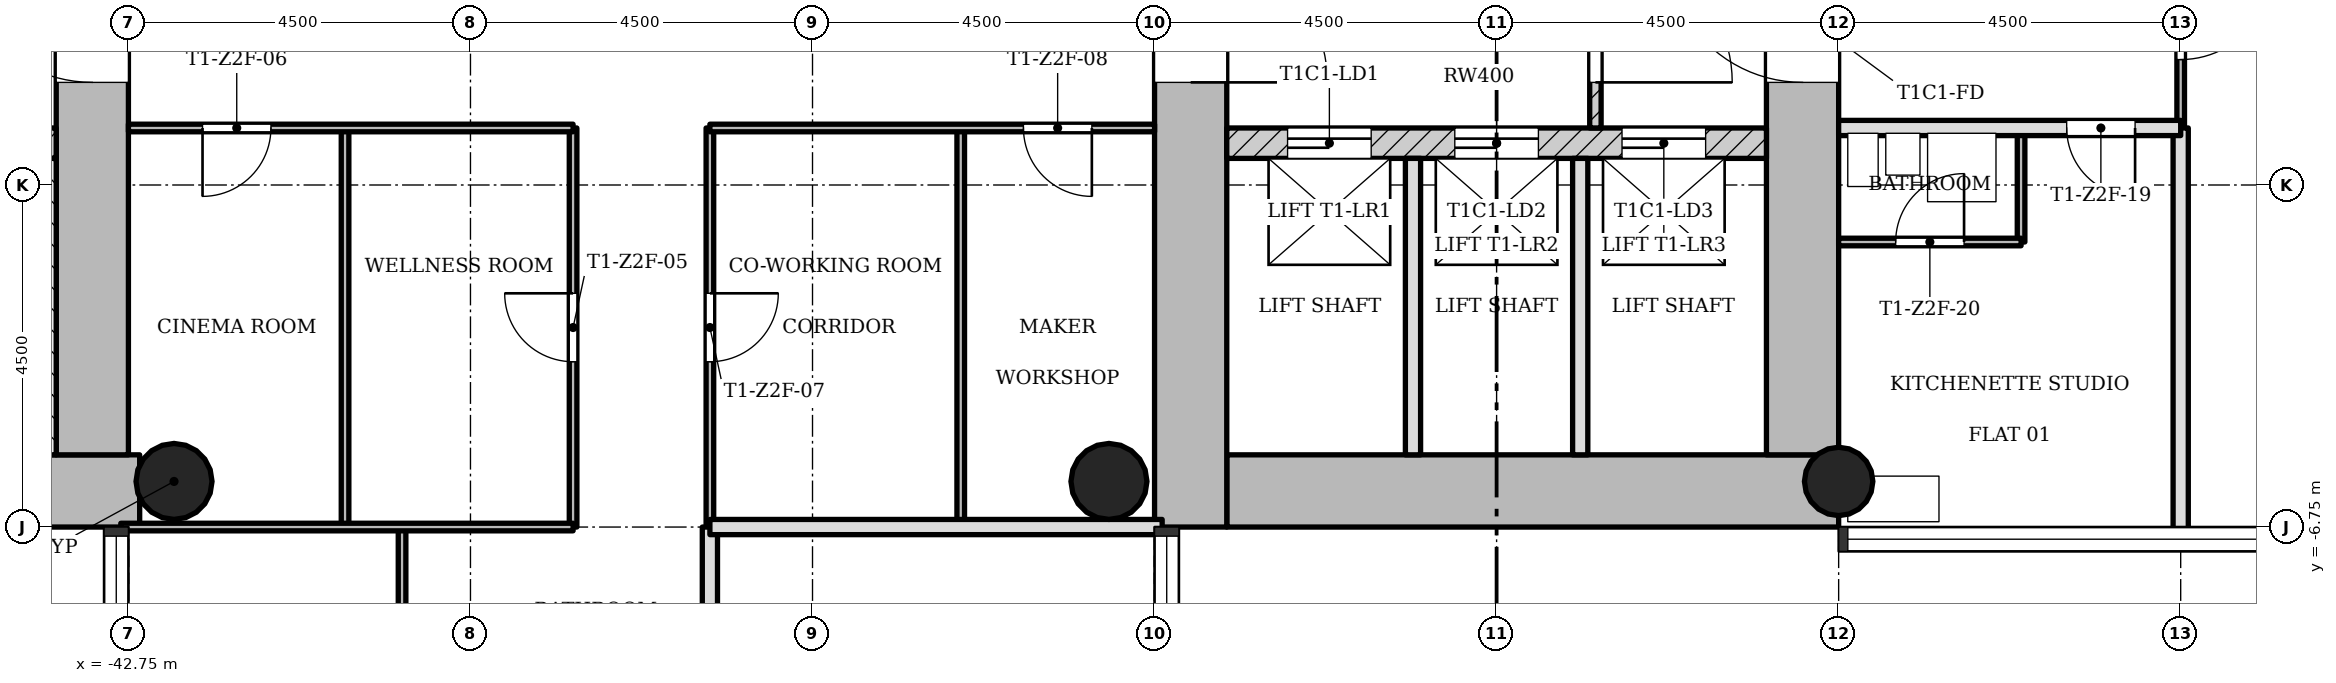
"""IFC4 building model, lengths in metres.
Left out: names, types, materials, properties, quantities, classifications, styles, units other than length and angle.
Written with IfcOpenShell. Run it as: python <this file> out.ifc"""

import sys

from ifc_helpers import new_model, si_unit, direction, frame, frame_2d, origin, origin_2d, place, context, subcontext, project, spatial, rectangle, hollow_circle, extrude, element, fill, save


model = new_model("IFC4")
c1 = context("Model", 3, precision=1e-05, world=origin(), true_north=direction((0.0, 1.0)))
c2 = subcontext(c1, "Body", "Model", "MODEL_VIEW")
j1 = project(units=[si_unit("LENGTHUNIT", "METRE"), si_unit("PLANEANGLEUNIT", "RADIAN")], contexts=[c1])
p1 = place(None, origin())
s1 = spatial("IfcSite", under=j1, at=p1, CompositionType="ELEMENT")
p2 = place(p1, origin())
s2 = spatial("IfcBuilding", under=s1, at=p2, CompositionType="ELEMENT")
p3 = place(p2, frame((0.0, 0.0, 110.6)))
s3 = spatial("IfcBuildingStorey", under=s2, at=p3, CompositionType="ELEMENT", Elevation=110.6)
p4 = place(p3, frame((-28.3, -6.275, 0.0), z_axis=(0.0, 0.0, 1.0), x_axis=(1.0, 0.0, 0.0)))
e1 = element("IfcWall", 1, at=p4, inside=s3, PredefinedType="SHEAR", context=c2, shape_type="SweptSolid", body=[
    extrude(rectangle(XDim=8.05, YDim=0.95, at=frame_2d((4.025, 0.0))), origin(), (0.0, 0.0, 1.0), 3.4),
])
p5 = place(p3, frame((-20.725, -5.8, 0.0), z_axis=(0.0, 0.0, 1.0), x_axis=(0.0, 1.0, 0.0)))
e2 = element("IfcWall", 2, at=p5, inside=s3, PredefinedType="SHEAR", context=c2, shape_type="SweptSolid", body=[
    extrude(rectangle(XDim=12.55, YDim=0.95, at=frame_2d((6.275, 0.0))), origin(), (0.0, 0.0, 1.0), 3.4),
])
p6 = place(p5, frame((4.9, 0.0, 0.0)))
e3 = element("IfcOpeningElement", 3, at=p6, cuts=e2, PredefinedType="OPENING", context=c2, shape_type="SweptSolid", body=[
    extrude(rectangle(XDim=1.8, YDim=2.1, at=frame_2d((0.9, 1.05))), frame((0.0, 0.485, 0.0), z_axis=(0.0, -1.0, 0.0), x_axis=(1.0, 0.0, 0.0)), (0.0, 0.0, 1.0), 0.97),
])
p7 = place(p3, frame((-28.775, 5.8, 0.0), z_axis=(0.0, 0.0, 1.0), x_axis=(0.0, -1.0, 0.0)))
e4 = element("IfcWall", 4, at=p7, inside=s3, PredefinedType="SHEAR", context=c2, shape_type="SweptSolid", body=[
    extrude(rectangle(XDim=12.55, YDim=0.95, at=frame_2d((6.275, 0.0))), origin(), (0.0, 0.0, 1.0), 3.4),
])
p8 = place(p7, frame((4.9, 0.0, 0.0)))
e5 = element("IfcOpeningElement", 5, at=p8, cuts=e4, PredefinedType="OPENING", context=c2, shape_type="SweptSolid", body=[
    extrude(rectangle(XDim=1.8, YDim=2.1, at=frame_2d((0.9, 1.05))), frame((0.0, 0.485, 0.0), z_axis=(0.0, -1.0, 0.0), x_axis=(1.0, 0.0, 0.0)), (0.0, 0.0, 1.0), 0.97),
])
p9 = place(p3, frame((-28.3, -1.7, 0.0), z_axis=(0.0, 0.0, 1.0), x_axis=(1.0, 0.0, 0.0)))
e6 = element("IfcWall", 6, at=p9, inside=s3, PredefinedType="SHEAR", context=c2, shape_type="SweptSolid", body=[
    extrude(rectangle(XDim=7.1, YDim=0.4, at=frame_2d((3.55, 0.0))), origin(), (0.0, 0.0, 1.0), 3.4),
])
p10 = place(p9, frame((0.8, 0.0, 0.0)))
e7 = element("IfcOpeningElement", 7, at=p10, cuts=e6, PredefinedType="OPENING", context=c2, shape_type="SweptSolid", body=[
    extrude(rectangle(XDim=1.1, YDim=2.1, at=frame_2d((0.55, 1.05))), frame((0.0, 0.21, 0.0), z_axis=(0.0, -1.0, 0.0), x_axis=(1.0, 0.0, 0.0)), (0.0, 0.0, 1.0), 0.42),
])
p11 = place(p9, frame((3.0, 0.0, 0.0)))
e8 = element("IfcOpeningElement", 8, at=p11, cuts=e6, PredefinedType="OPENING", context=c2, shape_type="SweptSolid", body=[
    extrude(rectangle(XDim=1.1, YDim=2.1, at=frame_2d((0.55, 1.05))), frame((0.0, 0.21, 0.0), z_axis=(0.0, -1.0, 0.0), x_axis=(1.0, 0.0, 0.0)), (0.0, 0.0, 1.0), 0.42),
])
p12 = place(p9, frame((5.2, 0.0, 0.0)))
e9 = element("IfcOpeningElement", 9, at=p12, cuts=e6, PredefinedType="OPENING", context=c2, shape_type="SweptSolid", body=[
    extrude(rectangle(XDim=1.1, YDim=2.1, at=frame_2d((0.55, 1.05))), frame((0.0, 0.21, 0.0), z_axis=(0.0, -1.0, 0.0), x_axis=(1.0, 0.0, 0.0)), (0.0, 0.0, 1.0), 0.42),
])
p13 = place(p3, frame((-51.298, -6.275, 0.0), z_axis=(0.0, 0.0, 1.0), x_axis=(1.0, 0.0, 0.0)))
e10 = element("IfcWall", 10, at=p13, inside=s3, PredefinedType="SHEAR", context=c2, shape_type="SweptSolid", body=[
    extrude(rectangle(XDim=8.696, YDim=0.95, at=frame_2d((4.348, 0.0))), origin(), (0.0, 0.0, 1.0), 3.4),
])
p14 = place(p3, frame((-43.225, -5.8, 0.0), z_axis=(0.0, 0.0, 1.0), x_axis=(0.0, 1.0, 0.0)))
e11 = element("IfcWall", 11, at=p14, inside=s3, PredefinedType="SHEAR", context=c2, shape_type="SweptSolid", body=[
    extrude(rectangle(XDim=12.55, YDim=0.95, at=frame_2d((6.275, 0.0))), origin(), (0.0, 0.0, 1.0), 3.4),
])
p15 = place(p14, frame((4.9, 0.0, 0.0)))
e12 = element("IfcOpeningElement", 12, at=p15, cuts=e11, PredefinedType="OPENING", context=c2, shape_type="SweptSolid", body=[
    extrude(rectangle(XDim=1.8, YDim=2.1, at=frame_2d((0.9, 1.05))), frame((0.0, 0.485, 0.0), z_axis=(0.0, -1.0, 0.0), x_axis=(1.0, 0.0, 0.0)), (0.0, 0.0, 1.0), 0.97),
])
p16 = place(p3, frame((-50.8, -1.7, 0.0), z_axis=(0.0, 0.0, 1.0), x_axis=(1.0, 0.0, 0.0)))
e13 = element("IfcWall", 13, at=p16, inside=s3, PredefinedType="SHEAR", context=c2, shape_type="SweptSolid", body=[
    extrude(rectangle(XDim=7.1, YDim=0.4, at=frame_2d((3.55, 0.0))), origin(), (0.0, 0.0, 1.0), 3.4),
])
p17 = place(p16, frame((5.5, 0.0, 0.0)))
e14 = element("IfcOpeningElement", 14, at=p17, cuts=e13, PredefinedType="OPENING", context=c2, shape_type="SweptSolid", body=[
    extrude(rectangle(XDim=0.9, YDim=2.1, at=frame_2d((0.45, 1.05))), frame((0.0, 0.21, 0.0), z_axis=(0.0, -1.0, 0.0), x_axis=(1.0, 0.0, 0.0)), (0.0, 0.0, 1.0), 0.42),
])
p18 = place(p3, frame((-20.25, -6.15, 0.0), z_axis=(0.0, 0.0, 1.0), x_axis=(1.0, 0.0, 0.0)))
e15 = element("IfcColumn", 15, at=p18, inside=s3, PredefinedType="COLUMN", context=c2, shape_type="SweptSolid", body=[
    extrude(hollow_circle(Radius=0.45, WallThickness=0.032, at=origin_2d()), origin(), (0.0, 0.0, 1.0), 3.4),
])
for number, where, z_axis, x_axis in (
    (16, (-42.15, -6.15, 0.0), (0.0, 0.0, 1.0), (1.0, 0.0, 0.0)),
    (17, (-29.85, -6.15, 0.0), (0.0, 0.0, 1.0), (1.0, 0.0, 0.0)),
):
    element("IfcColumn", number, at=place(p3, frame(where, z_axis=z_axis, x_axis=x_axis)), inside=s3, PredefinedType="COLUMN", context=c2, shape_type="SweptSolid", body=[
        extrude(hollow_circle(Radius=0.5, WallThickness=0.036, at=origin_2d()), origin(), (0.0, 0.0, 1.0), 3.4),
    ])
p19 = place(p3, frame((-23.45, -1.5, 0.0), z_axis=(0.0, 0.0, 1.0), x_axis=(0.0, 1.0, 0.0)))
e18 = element("IfcWall", 18, at=p19, inside=s3, PredefinedType="PARTITIONING", context=c2, shape_type="SweptSolid", body=[
    extrude(rectangle(XDim=3.0, YDim=0.15, at=frame_2d((1.5, 0.0))), origin(), (0.0, 0.0, 1.0), 3.0),
])
p20 = place(p19, frame((0.6, 0.0, 0.0)))
e19 = element("IfcOpeningElement", 19, at=p20, cuts=e18, PredefinedType="OPENING", context=c2, shape_type="SweptSolid", body=[
    extrude(rectangle(XDim=1.8, YDim=2.1, at=frame_2d((0.9, 1.05))), frame((0.0, 0.085, 0.0), z_axis=(0.0, -1.0, 0.0), x_axis=(1.0, 0.0, 0.0)), (0.0, 0.0, 1.0), 0.17),
])
for number, where, z_axis, x_axis in (
    (20, (-25.85, -5.8, 0.0), (0.0, 0.0, 1.0), (0.0, 1.0, 0.0)),
    (21, (-23.65, -5.8, 0.0), (0.0, 0.0, 1.0), (0.0, 1.0, 0.0)),
):
    element("IfcWall", number, at=place(p3, frame(where, z_axis=z_axis, x_axis=x_axis)), inside=s3, PredefinedType="SOLIDWALL", context=c2, shape_type="SweptSolid", body=[
        extrude(rectangle(XDim=3.9, YDim=0.2, at=frame_2d((1.95, 0.0))), origin(), (0.0, 0.0, 1.0), 3.0),
    ])
p21 = place(p3, frame((-39.9, -6.75, 0.0), z_axis=(0.0, 0.0, 1.0), x_axis=(0.0, 1.0, 0.0)))
e22 = element("IfcWall", 22, at=p21, inside=s3, PredefinedType="PARTITIONING", context=c2, shape_type="SweptSolid", body=[
    extrude(rectangle(XDim=5.25, YDim=0.1, at=frame_2d((2.625, 0.0))), origin(), (0.0, 0.0, 1.0), 3.0),
])
p22 = place(p3, frame((-39.15, -15.75, 0.0), z_axis=(0.0, 0.0, 1.0), x_axis=(0.0, 1.0, 0.0)))
e23 = element("IfcWall", 23, at=p22, inside=s3, PredefinedType="PARTITIONING", context=c2, shape_type="SweptSolid", body=[
    extrude(rectangle(XDim=9.0, YDim=0.1, at=frame_2d((4.5, 0.0))), origin(), (0.0, 0.0, 1.0), 3.0),
])
p23 = place(p22, frame((5.55, 0.0, 0.0)))
e24 = element("IfcOpeningElement", 24, at=p23, cuts=e23, PredefinedType="OPENING", context=c2, shape_type="SweptSolid", body=[
    extrude(rectangle(XDim=0.9, YDim=2.1, at=frame_2d((0.45, 1.05))), frame((0.0, 0.06, 0.0), z_axis=(0.0, -1.0, 0.0), x_axis=(1.0, 0.0, 0.0)), (0.0, 0.0, 1.0), 0.12),
])
p24 = place(p3, frame((-36.9, -6.75, 0.0), z_axis=(0.0, 0.0, 1.0), x_axis=(0.0, 1.0, 0.0)))
e25 = element("IfcWall", 25, at=p24, inside=s3, PredefinedType="PARTITIONING", context=c2, shape_type="SweptSolid", body=[
    extrude(rectangle(XDim=5.25, YDim=0.1, at=frame_2d((2.625, 0.0))), origin(), (0.0, 0.0, 1.0), 3.0),
])
p25 = place(p24, frame((2.175, 0.0, 0.0)))
e26 = element("IfcOpeningElement", 26, at=p25, cuts=e25, PredefinedType="OPENING", context=c2, shape_type="SweptSolid", body=[
    extrude(rectangle(XDim=0.9, YDim=2.1, at=frame_2d((0.45, 1.05))), frame((0.0, 0.06, 0.0), z_axis=(0.0, -1.0, 0.0), x_axis=(1.0, 0.0, 0.0)), (0.0, 0.0, 1.0), 0.12),
])
p26 = place(p3, frame((-35.1, -6.75, 0.0), z_axis=(0.0, 0.0, 1.0), x_axis=(0.0, 1.0, 0.0)))
e27 = element("IfcWall", 27, at=p26, inside=s3, PredefinedType="PARTITIONING", context=c2, shape_type="SweptSolid", body=[
    extrude(rectangle(XDim=5.25, YDim=0.1, at=frame_2d((2.625, 0.0))), origin(), (0.0, 0.0, 1.0), 3.0),
])
p27 = place(p26, frame((2.175, 0.0, 0.0)))
e28 = element("IfcOpeningElement", 28, at=p27, cuts=e27, PredefinedType="OPENING", context=c2, shape_type="SweptSolid", body=[
    extrude(rectangle(XDim=0.9, YDim=2.1, at=frame_2d((0.45, 1.05))), frame((0.0, 0.06, 0.0), z_axis=(0.0, -1.0, 0.0), x_axis=(1.0, 0.0, 0.0)), (0.0, 0.0, 1.0), 0.12),
])
p28 = place(p3, frame((-35.1, -8.55, 0.0), z_axis=(0.0, 0.0, 1.0), x_axis=(0.0, 1.0, 0.0)))
e29 = element("IfcWall", 29, at=p28, inside=s3, PredefinedType="SOLIDWALL", context=c2, shape_type="SweptSolid", body=[
    extrude(rectangle(XDim=1.8, YDim=0.2, at=frame_2d((0.9, 0.0))), origin(), (0.0, 0.0, 1.0), 3.0),
])
p29 = place(p3, frame((-31.8, -6.75, 0.0), z_axis=(0.0, 0.0, 1.0), x_axis=(0.0, 1.0, 0.0)))
e30 = element("IfcWall", 30, at=p29, inside=s3, PredefinedType="PARTITIONING", context=c2, shape_type="SweptSolid", body=[
    extrude(rectangle(XDim=5.25, YDim=0.1, at=frame_2d((2.625, 0.0))), origin(), (0.0, 0.0, 1.0), 3.0),
])
p30 = place(p3, frame((-17.85, -3.0, 0.0), z_axis=(0.0, 0.0, 1.0), x_axis=(0.0, 1.0, 0.0)))
e31 = element("IfcWall", 31, at=p30, inside=s3, PredefinedType="PARTITIONING", context=c2, shape_type="SweptSolid", body=[
    extrude(rectangle(XDim=1.5, YDim=0.1, at=frame_2d((0.75, 0.0))), origin(), (0.0, 0.0, 1.0), 3.0),
])
p31 = place(p3, frame((-15.75, -1.5, 0.0), z_axis=(0.0, 0.0, 1.0), x_axis=(0.0, 1.0, 0.0)))
e32 = element("IfcWall", 32, at=p31, inside=s3, PredefinedType="PARTITIONING", context=c2, shape_type="SweptSolid", body=[
    extrude(rectangle(XDim=3.0, YDim=0.1, at=frame_2d((1.5, 0.0))), origin(), (0.0, 0.0, 1.0), 3.0),
])
p32 = place(p31, frame((0.9, 0.0, 0.0)))
e33 = element("IfcOpeningElement", 33, at=p32, cuts=e32, PredefinedType="OPENING", context=c2, shape_type="SweptSolid", body=[
    extrude(rectangle(XDim=1.2, YDim=2.1, at=frame_2d((0.6, 1.05))), frame((0.0, 0.06, 0.0), z_axis=(0.0, -1.0, 0.0), x_axis=(1.0, 0.0, 0.0)), (0.0, 0.0, 1.0), 0.12),
])
p33 = place(p3, frame((-15.75, -6.85, 0.0), z_axis=(0.0, 0.0, 1.0), x_axis=(0.0, 1.0, 0.0)))
e34 = element("IfcWall", 34, at=p33, inside=s3, PredefinedType="SOLIDWALL", context=c2, shape_type="SweptSolid", body=[
    extrude(rectangle(XDim=5.35, YDim=0.2, at=frame_2d((2.675, 0.0))), origin(), (0.0, 0.0, 1.0), 3.0),
])
p34 = place(p3, frame((-42.85, -6.75, 0.0), z_axis=(0.0, 0.0, 1.0), x_axis=(1.0, 0.0, 0.0)))
e35 = element("IfcWall", 35, at=p34, inside=s3, PredefinedType="PARTITIONING", context=c2, shape_type="SweptSolid", body=[
    extrude(rectangle(XDim=5.95, YDim=0.1, at=frame_2d((2.975, 0.0))), origin(), (0.0, 0.0, 1.0), 3.0),
])
p35 = place(p3, frame((-35.1, -6.75, 0.0), z_axis=(0.0, 0.0, 1.0), x_axis=(1.0, 0.0, 0.0)))
e36 = element("IfcWall", 36, at=p35, inside=s3, PredefinedType="SOLIDWALL", context=c2, shape_type="SweptSolid", body=[
    extrude(rectangle(XDim=5.95, YDim=0.2, at=frame_2d((2.975, 0.0))), origin(), (0.0, 0.0, 1.0), 3.0),
])
p36 = place(p3, frame((-20.25, -3.0, 0.0), z_axis=(0.0, 0.0, 1.0), x_axis=(1.0, 0.0, 0.0)))
e37 = element("IfcWall", 37, at=p36, inside=s3, PredefinedType="PARTITIONING", context=c2, shape_type="SweptSolid", body=[
    extrude(rectangle(XDim=2.4, YDim=0.1, at=frame_2d((1.2, 0.0))), origin(), (0.0, 0.0, 1.0), 3.0),
])
p37 = place(p36, frame((0.75, 0.0, 0.0)))
e38 = element("IfcOpeningElement", 38, at=p37, cuts=e37, PredefinedType="OPENING", context=c2, shape_type="SweptSolid", body=[
    extrude(rectangle(XDim=0.9, YDim=2.1, at=frame_2d((0.45, 1.05))), frame((0.0, 0.06, 0.0), z_axis=(0.0, -1.0, 0.0), x_axis=(1.0, 0.0, 0.0)), (0.0, 0.0, 1.0), 0.12),
])
p38 = place(p3, frame((-42.75, -1.5, 0.0), z_axis=(0.0, 0.0, 1.0), x_axis=(1.0, 0.0, 0.0)))
e39 = element("IfcWall", 39, at=p38, inside=s3, PredefinedType="PARTITIONING", context=c2, shape_type="SweptSolid", body=[
    extrude(rectangle(XDim=5.85, YDim=0.1, at=frame_2d((2.925, 0.0))), origin(), (0.0, 0.0, 1.0), 3.0),
])
p39 = place(p38, frame((0.975, 0.0, 0.0)))
e40 = element("IfcOpeningElement", 40, at=p39, cuts=e39, PredefinedType="OPENING", context=c2, shape_type="SweptSolid", body=[
    extrude(rectangle(XDim=0.9, YDim=2.1, at=frame_2d((0.45, 1.05))), frame((0.0, 0.06, 0.0), z_axis=(0.0, -1.0, 0.0), x_axis=(1.0, 0.0, 0.0)), (0.0, 0.0, 1.0), 0.12),
])
p40 = place(p3, frame((-35.1, -1.5, 0.0), z_axis=(0.0, 0.0, 1.0), x_axis=(1.0, 0.0, 0.0)))
e41 = element("IfcWall", 41, at=p40, inside=s3, PredefinedType="PARTITIONING", context=c2, shape_type="SweptSolid", body=[
    extrude(rectangle(XDim=5.85, YDim=0.1, at=frame_2d((2.925, 0.0))), origin(), (0.0, 0.0, 1.0), 3.0),
])
p41 = place(p40, frame((4.125, 0.0, 0.0)))
e42 = element("IfcOpeningElement", 42, at=p41, cuts=e41, PredefinedType="OPENING", context=c2, shape_type="SweptSolid", body=[
    extrude(rectangle(XDim=0.9, YDim=2.1, at=frame_2d((0.45, 1.05))), frame((0.0, 0.06, 0.0), z_axis=(0.0, -1.0, 0.0), x_axis=(1.0, 0.0, 0.0)), (0.0, 0.0, 1.0), 0.12),
])
p42 = place(p3, frame((-20.25, -1.5, 0.0), z_axis=(0.0, 0.0, 1.0), x_axis=(1.0, 0.0, 0.0)))
e43 = element("IfcWall", 43, at=p42, inside=s3, PredefinedType="SOLIDWALL", context=c2, shape_type="SweptSolid", body=[
    extrude(rectangle(XDim=4.5, YDim=0.2, at=frame_2d((2.25, 0.0))), origin(), (0.0, 0.0, 1.0), 3.0),
])
p43 = place(p42, frame((3.0, 0.0, 0.0)))
e44 = element("IfcOpeningElement", 44, at=p43, cuts=e43, PredefinedType="OPENING", context=c2, shape_type="SweptSolid", body=[
    extrude(rectangle(XDim=0.9, YDim=2.1, at=frame_2d((0.45, 1.05))), frame((0.0, 0.11, 0.0), z_axis=(0.0, -1.0, 0.0), x_axis=(1.0, 0.0, 0.0)), (0.0, 0.0, 1.0), 0.22),
])
p44 = place(p3, frame((-43.825, -1.9, 0.0), z_axis=(0.0, 0.0, 1.0), x_axis=(0.0, -1.0, 0.0)))
e45 = element("IfcWall", 45, at=p44, inside=s3, PredefinedType="SHEAR", context=c2, shape_type="SweptSolid", body=[
    extrude(rectangle(XDim=3.9, YDim=0.25, at=frame_2d((1.95, 0.0))), origin(), (0.0, 0.0, 1.0), 3.4),
])
p45 = place(p20, origin())
e46 = element("IfcDoor", 46, at=p45, inside=s3, OperationType="SINGLE_SWING_LEFT", PredefinedType="DOOR", context=c2, shape_type="SweptSolid", body=[
    extrude(rectangle(XDim=1.8, YDim=2.1, at=frame_2d((0.9, 1.05))), frame((0.0, 0.025, 0.0), z_axis=(0.0, -1.0, 0.0), x_axis=(1.0, 0.0, 0.0)), (0.0, 0.0, 1.0), 0.05),
])
fill(e19, e46)
p46 = place(p25, origin())
e47 = element("IfcDoor", 47, at=p46, inside=s3, OperationType="SINGLE_SWING_LEFT", PredefinedType="DOOR", context=c2, shape_type="SweptSolid", body=[
    extrude(rectangle(XDim=0.9, YDim=2.1, at=frame_2d((0.45, 1.05))), frame((0.0, 0.025, 0.0), z_axis=(0.0, -1.0, 0.0), x_axis=(1.0, 0.0, 0.0)), (0.0, 0.0, 1.0), 0.05),
])
fill(e26, e47)
p47 = place(p39, origin())
e48 = element("IfcDoor", 48, at=p47, inside=s3, OperationType="SINGLE_SWING_LEFT", PredefinedType="DOOR", context=c2, shape_type="SweptSolid", body=[
    extrude(rectangle(XDim=0.9, YDim=2.1, at=frame_2d((0.45, 1.05))), frame((0.0, 0.025, 0.0), z_axis=(0.0, -1.0, 0.0), x_axis=(1.0, 0.0, 0.0)), (0.0, 0.0, 1.0), 0.05),
])
fill(e40, e48)
p48 = place(p27, origin())
e49 = element("IfcDoor", 49, at=p48, inside=s3, OperationType="SINGLE_SWING_RIGHT", PredefinedType="DOOR", context=c2, shape_type="SweptSolid", body=[
    extrude(rectangle(XDim=0.9, YDim=2.1, at=frame_2d((0.45, 1.05))), frame((0.0, 0.025, 0.0), z_axis=(0.0, -1.0, 0.0), x_axis=(1.0, 0.0, 0.0)), (0.0, 0.0, 1.0), 0.05),
])
fill(e28, e49)
p49 = place(p41, origin())
e50 = element("IfcDoor", 50, at=p49, inside=s3, OperationType="SINGLE_SWING_RIGHT", PredefinedType="DOOR", context=c2, shape_type="SweptSolid", body=[
    extrude(rectangle(XDim=0.9, YDim=2.1, at=frame_2d((0.45, 1.05))), frame((0.0, 0.025, 0.0), z_axis=(0.0, -1.0, 0.0), x_axis=(1.0, 0.0, 0.0)), (0.0, 0.0, 1.0), 0.05),
])
fill(e42, e50)
p50 = place(p43, origin())
e51 = element("IfcDoor", 51, at=p50, inside=s3, OperationType="SINGLE_SWING_RIGHT", PredefinedType="DOOR", context=c2, shape_type="SweptSolid", body=[
    extrude(rectangle(XDim=0.9, YDim=2.1, at=frame_2d((0.45, 1.05))), frame((0.0, 0.025, 0.0), z_axis=(0.0, -1.0, 0.0), x_axis=(1.0, 0.0, 0.0)), (0.0, 0.0, 1.0), 0.05),
])
fill(e44, e51)
p51 = place(p37, origin())
e52 = element("IfcDoor", 52, at=p51, inside=s3, OperationType="SINGLE_SWING_LEFT", PredefinedType="DOOR", context=c2, shape_type="SweptSolid", body=[
    extrude(rectangle(XDim=0.9, YDim=2.1, at=frame_2d((0.45, 1.05))), frame((0.0, 0.025, 0.0), z_axis=(0.0, -1.0, 0.0), x_axis=(1.0, 0.0, 0.0)), (0.0, 0.0, 1.0), 0.05),
])
fill(e38, e52)
p52 = place(p32, origin())
e53 = element("IfcDoor", 53, at=p52, inside=s3, OperationType="SINGLE_SWING_RIGHT", PredefinedType="DOOR", context=c2, shape_type="SweptSolid", body=[
    extrude(rectangle(XDim=1.2, YDim=2.1, at=frame_2d((0.6, 1.05))), frame((0.0, 0.025, 0.0), z_axis=(0.0, -1.0, 0.0), x_axis=(1.0, 0.0, 0.0)), (0.0, 0.0, 1.0), 0.05),
])
fill(e33, e53)
p53 = place(p10, origin())
e54 = element("IfcDoor", 54, at=p53, inside=s3, OperationType="SLIDING_TO_LEFT", PredefinedType="DOOR", context=c2, shape_type="SweptSolid", body=[
    extrude(rectangle(XDim=1.1, YDim=2.1, at=frame_2d((0.55, 1.05))), frame((0.0, 0.025, 0.0), z_axis=(0.0, -1.0, 0.0), x_axis=(1.0, 0.0, 0.0)), (0.0, 0.0, 1.0), 0.05),
])
fill(e7, e54)
p54 = place(p11, origin())
e55 = element("IfcDoor", 55, at=p54, inside=s3, OperationType="SLIDING_TO_LEFT", PredefinedType="DOOR", context=c2, shape_type="SweptSolid", body=[
    extrude(rectangle(XDim=1.1, YDim=2.1, at=frame_2d((0.55, 1.05))), frame((0.0, 0.025, 0.0), z_axis=(0.0, -1.0, 0.0), x_axis=(1.0, 0.0, 0.0)), (0.0, 0.0, 1.0), 0.05),
])
fill(e8, e55)
p55 = place(p12, origin())
e56 = element("IfcDoor", 56, at=p55, inside=s3, OperationType="SLIDING_TO_LEFT", PredefinedType="DOOR", context=c2, shape_type="SweptSolid", body=[
    extrude(rectangle(XDim=1.1, YDim=2.1, at=frame_2d((0.55, 1.05))), frame((0.0, 0.025, 0.0), z_axis=(0.0, -1.0, 0.0), x_axis=(1.0, 0.0, 0.0)), (0.0, 0.0, 1.0), 0.05),
])
fill(e9, e56)
p56 = place(p8, origin())
e57 = element("IfcDoor", 57, at=p56, inside=s3, OperationType="SINGLE_SWING_LEFT", PredefinedType="DOOR", context=c2, shape_type="SweptSolid", body=[
    extrude(rectangle(XDim=1.8, YDim=2.1, at=frame_2d((0.9, 1.05))), frame((0.0, 0.025, 0.0), z_axis=(0.0, -1.0, 0.0), x_axis=(1.0, 0.0, 0.0)), (0.0, 0.0, 1.0), 0.05),
])
fill(e5, e57)
p57 = place(p6, origin())
e58 = element("IfcDoor", 58, at=p57, inside=s3, OperationType="SINGLE_SWING_LEFT", PredefinedType="DOOR", context=c2, shape_type="SweptSolid", body=[
    extrude(rectangle(XDim=1.8, YDim=2.1, at=frame_2d((0.9, 1.05))), frame((0.0, 0.025, 0.0), z_axis=(0.0, -1.0, 0.0), x_axis=(1.0, 0.0, 0.0)), (0.0, 0.0, 1.0), 0.05),
])
fill(e3, e58)
p58 = place(p15, origin())
e59 = element("IfcDoor", 59, at=p58, inside=s3, OperationType="SINGLE_SWING_LEFT", PredefinedType="DOOR", context=c2, shape_type="SweptSolid", body=[
    extrude(rectangle(XDim=1.8, YDim=2.1, at=frame_2d((0.9, 1.05))), frame((0.0, 0.025, 0.0), z_axis=(0.0, -1.0, 0.0), x_axis=(1.0, 0.0, 0.0)), (0.0, 0.0, 1.0), 0.05),
])
fill(e12, e59)
save(model, sys.argv[1])
